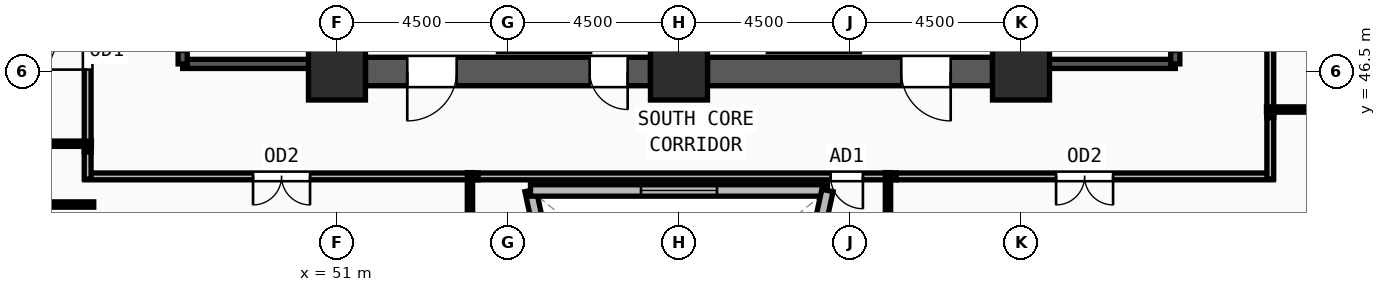
"""IFC4 building model, lengths in metres.
Left out: names, types, materials, properties, quantities, classifications, styles, units other than length and angle.
Written with IfcOpenShell. Run it as: python <this file> out.ifc"""

import sys

from ifc_helpers import new_model, si_unit, direction, frame, frame_2d, origin, origin_2d, place, context, subcontext, project, spatial, rectangle, extrude, source, transform, mapped, element, fill, save


model = new_model("IFC4")
c1 = context("Model", 3, precision=1e-05, world=origin(), true_north=direction((0.0, 1.0)))
c2 = subcontext(c1, "Body", "Model", "MODEL_VIEW")
j1 = project(units=[si_unit("LENGTHUNIT", "METRE"), si_unit("PLANEANGLEUNIT", "RADIAN")], contexts=[c1])
p1 = place(None, origin())
s1 = spatial("IfcSite", under=j1, at=p1, CompositionType="ELEMENT")
p2 = place(p1, origin())
s2 = spatial("IfcBuilding", under=s1, at=p2, CompositionType="ELEMENT")
p3 = place(p2, frame((0.0, 0.0, 177.75)))
s3 = spatial("IfcBuildingStorey", under=s2, at=p3, CompositionType="ELEMENT", Elevation=177.75)
m1 = source(origin(), c2, "Body", "SweptSolid", [
    extrude(rectangle(XDim=1.5, YDim=1.5, at=origin_2d()), origin(), (0.0, 0.0, 1.0), 3.75),
])
for number, where, z_axis, x_axis in (
    (1, (51.0, 46.5, 0.0), (0.0, 0.0, 1.0), (1.0, 0.0, 0.0)),
    (2, (60.0, 46.5, 0.0), (0.0, 0.0, 1.0), (1.0, 0.0, 0.0)),
    (3, (69.0, 46.5, 0.0), (0.0, 0.0, 1.0), (1.0, 0.0, 0.0)),
):
    element("IfcColumn", number, at=place(p3, frame(where, z_axis=z_axis, x_axis=x_axis)), inside=s3, PredefinedType="COLUMN", context=c2, shape_type="MappedRepresentation", body=[
        mapped(m1, transform((0.0, 0.0, 0.0), x_axis=(1.0, 0.0, 0.0), y_axis=(0.0, 1.0, 0.0), z_axis=(0.0, 0.0, 1.0), scale=1.0)),
    ])
p4 = place(p3, frame((66.012, 18.082, 0.0), z_axis=(0.0, 0.0, 1.0), x_axis=(0.551595967402, 0.834111436647, 0.0)))
e4 = element("IfcWall", 4, at=p4, inside=s3, PredefinedType="SOLIDWALL", context=c2, shape_type="SweptSolid", body=[
    extrude(rectangle(XDim=30.111, YDim=0.42, at=frame_2d((15.056, 0.0))), origin(), (0.0, 0.0, 1.0), 3.57),
])
m2 = source(origin(), c2, "Body", "SweptSolid", [
    extrude(rectangle(XDim=1.65, YDim=1.95, at=frame_2d((0.825, 0.975))), frame((0.0, 0.22, 0.0), z_axis=(0.0, -1.0, 0.0), x_axis=(1.0, 0.0, 0.0)), (0.0, 0.0, 1.0), 0.44),
])
p5 = place(p4, frame((6.703, 0.0, 0.55)))
e5 = element("IfcOpeningElement", 5, at=p5, cuts=e4, PredefinedType="OPENING", context=c2, shape_type="MappedRepresentation", body=[
    mapped(m2, transform((0.0, 0.0, 0.0), x_axis=(1.0, 0.0, 0.0), y_axis=(0.0, 1.0, 0.0), z_axis=(0.0, 0.0, 1.0), scale=1.0)),
])
p6 = place(p4, frame((14.231, 0.0, 0.55)))
e6 = element("IfcOpeningElement", 6, at=p6, cuts=e4, PredefinedType="OPENING", context=c2, shape_type="MappedRepresentation", body=[
    mapped(m2, transform((0.0, 0.0, 0.0), x_axis=(1.0, 0.0, 0.0), y_axis=(0.0, 1.0, 0.0), z_axis=(0.0, 0.0, 1.0), scale=1.0)),
])
p7 = place(p4, frame((21.758, 0.0, 0.55)))
e7 = element("IfcOpeningElement", 7, at=p7, cuts=e4, PredefinedType="OPENING", context=c2, shape_type="MappedRepresentation", body=[
    mapped(m2, transform((0.0, 0.0, 0.0), x_axis=(1.0, 0.0, 0.0), y_axis=(0.0, 1.0, 0.0), z_axis=(0.0, 0.0, 1.0), scale=1.0)),
])
p8 = place(p3, frame((68.25, 46.5, 0.0), z_axis=(0.0, 0.0, 1.0), x_axis=(-1.0, 0.0, 0.0)))
e8 = element("IfcWall", 8, at=p8, inside=s3, PredefinedType="SHEAR", context=c2, shape_type="SweptSolid", body=[
    extrude(rectangle(XDim=7.5, YDim=0.75, at=frame_2d((3.75, 0.0))), origin(), (0.0, 0.0, 1.0), 3.57),
])
m3 = source(origin(), c2, "Body", "SweptSolid", [
    extrude(rectangle(XDim=1.3, YDim=2.2, at=frame_2d((0.65, 1.1))), frame((0.0, 0.385, 0.0), z_axis=(0.0, -1.0, 0.0), x_axis=(1.0, 0.0, 0.0)), (0.0, 0.0, 1.0), 0.77),
])
p9 = place(p8, frame((1.1, 0.0, 0.0)))
e9 = element("IfcOpeningElement", 9, at=p9, cuts=e8, PredefinedType="OPENING", context=c2, shape_type="MappedRepresentation", body=[
    mapped(m3, transform((0.0, 0.0, 0.0), x_axis=(1.0, 0.0, 0.0), y_axis=(0.0, 1.0, 0.0), z_axis=(0.0, 0.0, 1.0), scale=1.0)),
])
p10 = place(p3, frame((59.25, 46.5, 0.0), z_axis=(0.0, 0.0, 1.0), x_axis=(-1.0, 0.0, 0.0)))
e10 = element("IfcWall", 10, at=p10, inside=s3, PredefinedType="SHEAR", context=c2, shape_type="SweptSolid", body=[
    extrude(rectangle(XDim=7.5, YDim=0.75, at=frame_2d((3.75, 0.0))), origin(), (0.0, 0.0, 1.0), 3.57),
])
p11 = place(p10, frame((5.1, 0.0, 0.0)))
e11 = element("IfcOpeningElement", 11, at=p11, cuts=e10, PredefinedType="OPENING", context=c2, shape_type="MappedRepresentation", body=[
    mapped(m3, transform((0.0, 0.0, 0.0), x_axis=(1.0, 0.0, 0.0), y_axis=(0.0, 1.0, 0.0), z_axis=(0.0, 0.0, 1.0), scale=1.0)),
])
m4 = source(origin(), c2, "Body", "SweptSolid", [
    extrude(rectangle(XDim=1.0, YDim=2.2, at=frame_2d((0.5, 1.1))), frame((0.0, 0.385, 0.0), z_axis=(0.0, -1.0, 0.0), x_axis=(1.0, 0.0, 0.0)), (0.0, 0.0, 1.0), 0.77),
])
p12 = place(p10, frame((0.6, 0.0, 0.0)))
e12 = element("IfcOpeningElement", 12, at=p12, cuts=e10, PredefinedType="OPENING", context=c2, shape_type="MappedRepresentation", body=[
    mapped(m4, transform((0.0, 0.0, 0.0), x_axis=(1.0, 0.0, 0.0), y_axis=(0.0, 1.0, 0.0), z_axis=(0.0, 0.0, 1.0), scale=1.0)),
])
p13 = place(p3, frame((46.94, 46.7, 0.0), z_axis=(0.0, 0.0, 1.0), x_axis=(1.0, 0.0, 0.0)))
e13 = element("IfcWall", 13, at=p13, inside=s3, PredefinedType="SOLIDWALL", context=c2, shape_type="SweptSolid", body=[
    extrude(rectangle(XDim=3.44, YDim=0.24, at=frame_2d((1.72, 0.0))), origin(), (0.0, 0.0, 1.0), 3.57),
])
p14 = place(p3, frame((50.38, 46.7, 0.0), z_axis=(0.0, 0.0, 1.0), x_axis=(0.0, 1.0, 0.0)))
e14 = element("IfcWall", 14, at=p14, inside=s3, PredefinedType="SOLIDWALL", context=c2, shape_type="SweptSolid", body=[
    extrude(rectangle(XDim=7.82, YDim=0.24, at=frame_2d((3.91, 0.0))), origin(), (0.0, 0.0, 1.0), 3.57),
])
p15 = place(p3, frame((46.94, 54.52, 0.0), z_axis=(0.0, 0.0, 1.0), x_axis=(0.0, -1.0, 0.0)))
e15 = element("IfcWall", 15, at=p15, inside=s3, PredefinedType="SOLIDWALL", context=c2, shape_type="SweptSolid", body=[
    extrude(rectangle(XDim=7.82, YDim=0.24, at=frame_2d((3.91, 0.0))), origin(), (0.0, 0.0, 1.0), 3.57),
])
m5 = source(origin(), c2, "Body", "SweptSolid", [
    extrude(rectangle(XDim=1.2, YDim=2.2, at=frame_2d((0.6, 1.1))), frame((0.0, 0.13, 0.0), z_axis=(0.0, -1.0, 0.0), x_axis=(1.0, 0.0, 0.0)), (0.0, 0.0, 1.0), 0.26),
])
p16 = place(p15, frame((6.3, 0.0, 0.0)))
e16 = element("IfcOpeningElement", 16, at=p16, cuts=e15, PredefinedType="OPENING", context=c2, shape_type="MappedRepresentation", body=[
    mapped(m5, transform((0.0, 0.0, 0.0), x_axis=(1.0, 0.0, 0.0), y_axis=(0.0, 1.0, 0.0), z_axis=(0.0, 0.0, 1.0), scale=1.0)),
])
p17 = place(p3, frame((69.62, 46.7, 0.0), z_axis=(0.0, 0.0, 1.0), x_axis=(1.0, 0.0, 0.0)))
e17 = element("IfcWall", 17, at=p17, inside=s3, PredefinedType="SOLIDWALL", context=c2, shape_type="SweptSolid", body=[
    extrude(rectangle(XDim=3.44, YDim=0.24, at=frame_2d((1.72, 0.0))), origin(), (0.0, 0.0, 1.0), 3.57),
])
p18 = place(p3, frame((73.06, 46.7, 0.0), z_axis=(0.0, 0.0, 1.0), x_axis=(0.0, 1.0, 0.0)))
e18 = element("IfcWall", 18, at=p18, inside=s3, PredefinedType="SOLIDWALL", context=c2, shape_type="SweptSolid", body=[
    extrude(rectangle(XDim=7.82, YDim=0.24, at=frame_2d((3.91, 0.0))), origin(), (0.0, 0.0, 1.0), 3.57),
])
p19 = place(p18, frame((0.32, 0.0, 0.0)))
e19 = element("IfcOpeningElement", 19, at=p19, cuts=e18, PredefinedType="OPENING", context=c2, shape_type="MappedRepresentation", body=[
    mapped(m5, transform((0.0, 0.0, 0.0), x_axis=(1.0, 0.0, 0.0), y_axis=(0.0, 1.0, 0.0), z_axis=(0.0, 0.0, 1.0), scale=1.0)),
])
p20 = place(p3, frame((69.62, 54.52, 0.0), z_axis=(0.0, 0.0, 1.0), x_axis=(0.0, -1.0, 0.0)))
e20 = element("IfcWall", 20, at=p20, inside=s3, PredefinedType="SOLIDWALL", context=c2, shape_type="SweptSolid", body=[
    extrude(rectangle(XDim=7.82, YDim=0.24, at=frame_2d((3.91, 0.0))), origin(), (0.0, 0.0, 1.0), 3.57),
])
p21 = place(p3, frame((57.461, 37.046, 0.0), z_axis=(0.0, 0.0, 1.0), x_axis=(-0.211409755765, 0.977397521568, 0.0)))
e21 = element("IfcWall", 21, at=p21, inside=s3, PredefinedType="SOLIDWALL", context=c2, shape_type="SweptSolid", body=[
    extrude(rectangle(XDim=6.47, YDim=0.3, at=frame_2d((3.235, 0.0))), origin(), (0.0, 0.0, 1.0), 3.57),
])
m6 = source(origin(), c2, "Body", "SweptSolid", [
    extrude(rectangle(XDim=2.0, YDim=1.9, at=frame_2d((1.0, 0.95))), frame((0.0, 0.16, 0.0), z_axis=(0.0, -1.0, 0.0), x_axis=(1.0, 0.0, 0.0)), (0.0, 0.0, 1.0), 0.32),
])
p22 = place(p21, frame((2.235, 0.0, 0.55)))
e22 = element("IfcOpeningElement", 22, at=p22, cuts=e21, PredefinedType="OPENING", context=c2, shape_type="MappedRepresentation", body=[
    mapped(m6, transform((0.0, 0.0, 0.0), x_axis=(1.0, 0.0, 0.0), y_axis=(0.0, 1.0, 0.0), z_axis=(0.0, 0.0, 1.0), scale=1.0)),
])
p23 = place(p3, frame((56.093, 43.37, 0.0), z_axis=(0.0, 0.0, 1.0), x_axis=(1.0, 0.0, 0.0)))
e23 = element("IfcWall", 23, at=p23, inside=s3, PredefinedType="SOLIDWALL", context=c2, shape_type="SweptSolid", body=[
    extrude(rectangle(XDim=7.814, YDim=0.3, at=frame_2d((3.907, 0.0))), origin(), (0.0, 0.0, 1.0), 3.57),
])
p24 = place(p23, frame((2.907, 0.0, 0.55)))
e24 = element("IfcOpeningElement", 24, at=p24, cuts=e23, PredefinedType="OPENING", context=c2, shape_type="MappedRepresentation", body=[
    mapped(m6, transform((0.0, 0.0, 0.0), x_axis=(1.0, 0.0, 0.0), y_axis=(0.0, 1.0, 0.0), z_axis=(0.0, 0.0, 1.0), scale=1.0)),
])
p25 = place(p3, frame((63.907, 43.37, 0.0), z_axis=(0.0, 0.0, 1.0), x_axis=(-0.211409755765, -0.977397521568, 0.0)))
e25 = element("IfcWall", 25, at=p25, inside=s3, PredefinedType="SOLIDWALL", context=c2, shape_type="SweptSolid", body=[
    extrude(rectangle(XDim=6.47, YDim=0.3, at=frame_2d((3.235, 0.0))), origin(), (0.0, 0.0, 1.0), 3.57),
])
p26 = place(p25, frame((2.235, 0.0, 0.55)))
e26 = element("IfcOpeningElement", 26, at=p26, cuts=e25, PredefinedType="OPENING", context=c2, shape_type="MappedRepresentation", body=[
    mapped(m6, transform((0.0, 0.0, 0.0), x_axis=(1.0, 0.0, 0.0), y_axis=(0.0, 1.0, 0.0), z_axis=(0.0, 0.0, 1.0), scale=1.0)),
])
p27 = place(p3, frame((44.44, 44.385, 0.0), z_axis=(0.0, 0.0, 1.0), x_axis=(0.0, 1.0, 0.0)))
e27 = element("IfcWall", 27, at=p27, inside=s3, PredefinedType="PARTITIONING", context=c2, shape_type="SweptSolid", body=[
    extrude(rectangle(XDim=5.33, YDim=0.18, at=frame_2d((2.665, 0.0))), origin(), (0.0, 0.0, 1.0), 3.57),
])
m7 = source(origin(), c2, "Body", "SweptSolid", [
    extrude(rectangle(XDim=1.0, YDim=2.2, at=frame_2d((0.5, 1.1))), frame((0.0, 0.1, 0.0), z_axis=(0.0, -1.0, 0.0), x_axis=(1.0, 0.0, 0.0)), (0.0, 0.0, 1.0), 0.2),
])
p28 = place(p27, frame((2.165, 0.0, 0.0)))
e28 = element("IfcOpeningElement", 28, at=p28, cuts=e27, PredefinedType="OPENING", context=c2, shape_type="MappedRepresentation", body=[
    mapped(m7, transform((0.0, 0.0, 0.0), x_axis=(1.0, 0.0, 0.0), y_axis=(0.0, 1.0, 0.0), z_axis=(0.0, 0.0, 1.0), scale=1.0)),
])
p29 = place(p3, frame((54.715, 43.74, 0.0), z_axis=(0.0, 0.0, 1.0), x_axis=(-1.0, 0.0, 0.0)))
e29 = element("IfcWall", 29, at=p29, inside=s3, PredefinedType="PARTITIONING", context=c2, shape_type="SweptSolid", body=[
    extrude(rectangle(XDim=10.345, YDim=0.18, at=frame_2d((5.172, 0.0))), origin(), (0.0, 0.0, 1.0), 3.57),
])
m8 = source(origin(), c2, "Body", "SweptSolid", [
    extrude(rectangle(XDim=1.5, YDim=2.2, at=frame_2d((0.75, 1.1))), frame((0.0, 0.1, 0.0), z_axis=(0.0, -1.0, 0.0), x_axis=(1.0, 0.0, 0.0)), (0.0, 0.0, 1.0), 0.2),
])
p30 = place(p29, frame((4.423, 0.0, 0.0)))
e30 = element("IfcOpeningElement", 30, at=p30, cuts=e29, PredefinedType="OPENING", context=c2, shape_type="MappedRepresentation", body=[
    mapped(m8, transform((0.0, 0.0, 0.0), x_axis=(1.0, 0.0, 0.0), y_axis=(0.0, 1.0, 0.0), z_axis=(0.0, 0.0, 1.0), scale=1.0)),
])
p31 = place(p3, frame((65.715, 43.74, 0.0), z_axis=(0.0, 0.0, 1.0), x_axis=(-1.0, 0.0, 0.0)))
e31 = element("IfcWall", 31, at=p31, inside=s3, PredefinedType="PARTITIONING", context=c2, shape_type="SweptSolid", body=[
    extrude(rectangle(XDim=11.0, YDim=0.18, at=frame_2d((5.5, 0.0))), origin(), (0.0, 0.0, 1.0), 3.57),
])
m9 = source(origin(), c2, "Body", "SweptSolid", [
    extrude(rectangle(XDim=0.85, YDim=2.1, at=frame_2d((0.425, 1.05))), frame((0.0, 0.1, 0.0), z_axis=(0.0, -1.0, 0.0), x_axis=(1.0, 0.0, 0.0)), (0.0, 0.0, 1.0), 0.2),
])
p32 = place(p31, frame((0.875, 0.0, 0.0)))
e32 = element("IfcOpeningElement", 32, at=p32, cuts=e31, PredefinedType="OPENING", context=c2, shape_type="MappedRepresentation", body=[
    mapped(m9, transform((0.0, 0.0, 0.0), x_axis=(1.0, 0.0, 0.0), y_axis=(0.0, 1.0, 0.0), z_axis=(0.0, 0.0, 1.0), scale=1.0)),
])
p33 = place(p3, frame((75.63, 43.74, 0.0), z_axis=(0.0, 0.0, 1.0), x_axis=(-1.0, 0.0, 0.0)))
e33 = element("IfcWall", 33, at=p33, inside=s3, PredefinedType="PARTITIONING", context=c2, shape_type="SweptSolid", body=[
    extrude(rectangle(XDim=9.915, YDim=0.18, at=frame_2d((4.958, 0.0))), origin(), (0.0, 0.0, 1.0), 3.57),
])
p34 = place(p33, frame((4.207, 0.0, 0.0)))
e34 = element("IfcOpeningElement", 34, at=p34, cuts=e33, PredefinedType="OPENING", context=c2, shape_type="MappedRepresentation", body=[
    mapped(m8, transform((0.0, 0.0, 0.0), x_axis=(1.0, 0.0, 0.0), y_axis=(0.0, 1.0, 0.0), z_axis=(0.0, 0.0, 1.0), scale=1.0)),
])
p35 = place(p3, frame((75.56, 52.215, 0.0), z_axis=(0.0, 0.0, 1.0), x_axis=(0.0, -1.0, 0.0)))
e35 = element("IfcWall", 35, at=p35, inside=s3, PredefinedType="PARTITIONING", context=c2, shape_type="SweptSolid", body=[
    extrude(rectangle(XDim=6.93, YDim=0.18, at=frame_2d((3.465, 0.0))), origin(), (0.0, 0.0, 1.0), 3.155),
])
p36 = place(p35, frame((2.965, 0.0, 0.0)))
e36 = element("IfcOpeningElement", 36, at=p36, cuts=e35, PredefinedType="OPENING", context=c2, shape_type="MappedRepresentation", body=[
    mapped(m7, transform((0.0, 0.0, 0.0), x_axis=(1.0, 0.0, 0.0), y_axis=(0.0, 1.0, 0.0), z_axis=(0.0, 0.0, 1.0), scale=1.0)),
])
p37 = place(p3, frame((44.44, 43.67, 0.0), z_axis=(0.0, 0.0, 1.0), x_axis=(0.0, 1.0, 0.0)))
e37 = element("IfcWall", 37, at=p37, inside=s3, PredefinedType="PARTITIONING", context=c2, shape_type="SweptSolid", body=[
    extrude(rectangle(XDim=0.715, YDim=0.18, at=frame_2d((0.357, 0.0))), origin(), (0.0, 0.0, 1.0), 3.57),
])
p38 = place(p3, frame((75.56, 45.285, 0.0), z_axis=(0.0, 0.0, 1.0), x_axis=(0.0, -1.0, 0.0)))
e38 = element("IfcWall", 38, at=p38, inside=s3, PredefinedType="PARTITIONING", context=c2, shape_type="SweptSolid", body=[
    extrude(rectangle(XDim=1.615, YDim=0.18, at=frame_2d((0.808, 0.0))), origin(), (0.0, 0.0, 1.0), 3.57),
])
p39 = place(p3, frame((44.6, 43.0, 0.0), z_axis=(0.0, 0.0, 1.0), x_axis=(-1.0, 0.0, 0.0)))
e39 = element("IfcWall", 39, at=p39, inside=s3, PredefinedType="PARTITIONING", context=c2, shape_type="SweptSolid", body=[
    extrude(rectangle(XDim=7.562, YDim=0.14, at=frame_2d((3.781, 0.0))), origin(), (0.0, 0.0, 1.0), 3.57),
])
p40 = place(p3, frame((44.54, 44.6, 0.0), z_axis=(0.0, 0.0, 1.0), x_axis=(-1.0, 0.0, 0.0)))
e40 = element("IfcWall", 40, at=p40, inside=s3, PredefinedType="PARTITIONING", context=c2, shape_type="SweptSolid", body=[
    extrude(rectangle(XDim=8.3, YDim=0.14, at=frame_2d((4.15, 0.0))), origin(), (0.0, 0.0, 1.0), 3.57),
])
p41 = place(p3, frame((75.46, 45.5, 0.0), z_axis=(0.0, 0.0, 1.0), x_axis=(1.0, 0.0, 0.0)))
e41 = element("IfcWall", 41, at=p41, inside=s3, PredefinedType="PARTITIONING", context=c2, shape_type="SweptSolid", body=[
    extrude(rectangle(XDim=9.078, YDim=0.14, at=frame_2d((4.539, 0.0))), origin(), (0.0, 0.0, 1.0), 3.57),
])
for number, where, z_axis, x_axis in (
    (42, (54.5, 43.84, 0.0), (0.0, 0.0, 1.0), (0.0, -1.0, 0.0)),
    (43, (65.5, 43.84, 0.0), (0.0, 0.0, 1.0), (0.0, -1.0, 0.0)),
):
    element("IfcWall", number, at=place(p3, frame(where, z_axis=z_axis, x_axis=x_axis)), inside=s3, PredefinedType="PARTITIONING", context=c2, shape_type="SweptSolid", body=[
        extrude(rectangle(XDim=26.95, YDim=0.14, at=frame_2d((13.475, 0.0))), origin(), (0.0, 0.0, 1.0), 2.755),
    ])
m10 = source(origin(), c2, "Body", "SweptSolid", [
    extrude(rectangle(XDim=1.3, YDim=2.2, at=frame_2d((0.65, 1.1))), frame((0.0, 0.025, 0.0), z_axis=(0.0, -1.0, 0.0), x_axis=(1.0, 0.0, 0.0)), (0.0, 0.0, 1.0), 0.05),
])
p42 = place(p11, origin())
e44 = element("IfcDoor", 44, at=p42, inside=s3, OperationType="SINGLE_SWING_RIGHT", PredefinedType="DOOR", context=c2, shape_type="MappedRepresentation", body=[
    mapped(m10, transform((0.0, 0.0, 0.0), x_axis=(1.0, 0.0, 0.0), y_axis=(0.0, 1.0, 0.0), z_axis=(0.0, 0.0, 1.0), scale=1.0)),
])
fill(e11, e44)
m11 = source(origin(), c2, "Body", "SweptSolid", [
    extrude(rectangle(XDim=1.0, YDim=2.2, at=frame_2d((0.5, 1.1))), frame((0.0, 0.025, 0.0), z_axis=(0.0, -1.0, 0.0), x_axis=(1.0, 0.0, 0.0)), (0.0, 0.0, 1.0), 0.05),
])
p43 = place(p12, origin())
e45 = element("IfcDoor", 45, at=p43, inside=s3, OperationType="SINGLE_SWING_LEFT", PredefinedType="DOOR", context=c2, shape_type="MappedRepresentation", body=[
    mapped(m11, transform((0.0, 0.0, 0.0), x_axis=(1.0, 0.0, 0.0), y_axis=(0.0, 1.0, 0.0), z_axis=(0.0, 0.0, 1.0), scale=1.0)),
])
fill(e12, e45)
p44 = place(p9, origin())
e46 = element("IfcDoor", 46, at=p44, inside=s3, OperationType="SINGLE_SWING_LEFT", PredefinedType="DOOR", context=c2, shape_type="MappedRepresentation", body=[
    mapped(m10, transform((0.0, 0.0, 0.0), x_axis=(1.0, 0.0, 0.0), y_axis=(0.0, 1.0, 0.0), z_axis=(0.0, 0.0, 1.0), scale=1.0)),
])
fill(e9, e46)
m12 = source(origin(), c2, "Body", "SweptSolid", [
    extrude(rectangle(XDim=2.0, YDim=1.9, at=frame_2d((1.0, 0.95))), frame((0.0, 0.03, 0.0), z_axis=(0.0, -1.0, 0.0), x_axis=(1.0, 0.0, 0.0)), (0.0, 0.0, 1.0), 0.06),
])
p45 = place(p24, origin())
e47 = element("IfcWindow", 47, at=p45, inside=s3, PartitioningType="DOUBLE_PANEL_VERTICAL", PredefinedType="WINDOW", context=c2, shape_type="MappedRepresentation", body=[
    mapped(m12, transform((0.0, 0.0, 0.0), x_axis=(1.0, 0.0, 0.0), y_axis=(0.0, 1.0, 0.0), z_axis=(0.0, 0.0, 1.0), scale=1.0)),
])
fill(e24, e47)
p46 = place(p28, origin())
e48 = element("IfcDoor", 48, at=p46, inside=s3, OperationType="SINGLE_SWING_LEFT", PredefinedType="DOOR", context=c2, shape_type="MappedRepresentation", body=[
    mapped(m11, transform((0.0, 0.0, 0.0), x_axis=(1.0, 0.0, 0.0), y_axis=(0.0, 1.0, 0.0), z_axis=(0.0, 0.0, 1.0), scale=1.0)),
])
fill(e28, e48)
m13 = source(origin(), c2, "Body", "SweptSolid", [
    extrude(rectangle(XDim=1.5, YDim=2.2, at=frame_2d((0.75, 1.1))), frame((0.0, 0.025, 0.0), z_axis=(0.0, -1.0, 0.0), x_axis=(1.0, 0.0, 0.0)), (0.0, 0.0, 1.0), 0.05),
])
p47 = place(p30, origin())
e49 = element("IfcDoor", 49, at=p47, inside=s3, OperationType="DOUBLE_DOOR_SINGLE_SWING", PredefinedType="DOOR", context=c2, shape_type="MappedRepresentation", body=[
    mapped(m13, transform((0.0, 0.0, 0.0), x_axis=(1.0, 0.0, 0.0), y_axis=(0.0, 1.0, 0.0), z_axis=(0.0, 0.0, 1.0), scale=1.0)),
])
fill(e30, e49)
m14 = source(origin(), c2, "Body", "SweptSolid", [
    extrude(rectangle(XDim=0.85, YDim=2.1, at=frame_2d((0.425, 1.05))), frame((0.0, 0.025, 0.0), z_axis=(0.0, -1.0, 0.0), x_axis=(1.0, 0.0, 0.0)), (0.0, 0.0, 1.0), 0.05),
])
p48 = place(p32, origin())
e50 = element("IfcDoor", 50, at=p48, inside=s3, OperationType="SINGLE_SWING_LEFT", PredefinedType="DOOR", context=c2, shape_type="MappedRepresentation", body=[
    mapped(m14, transform((0.0, 0.0, 0.0), x_axis=(1.0, 0.0, 0.0), y_axis=(0.0, 1.0, 0.0), z_axis=(0.0, 0.0, 1.0), scale=1.0)),
])
fill(e32, e50)
p49 = place(p34, origin())
e51 = element("IfcDoor", 51, at=p49, inside=s3, OperationType="DOUBLE_DOOR_SINGLE_SWING", PredefinedType="DOOR", context=c2, shape_type="MappedRepresentation", body=[
    mapped(m13, transform((0.0, 0.0, 0.0), x_axis=(1.0, 0.0, 0.0), y_axis=(0.0, 1.0, 0.0), z_axis=(0.0, 0.0, 1.0), scale=1.0)),
])
fill(e34, e51)
save(model, sys.argv[1])
